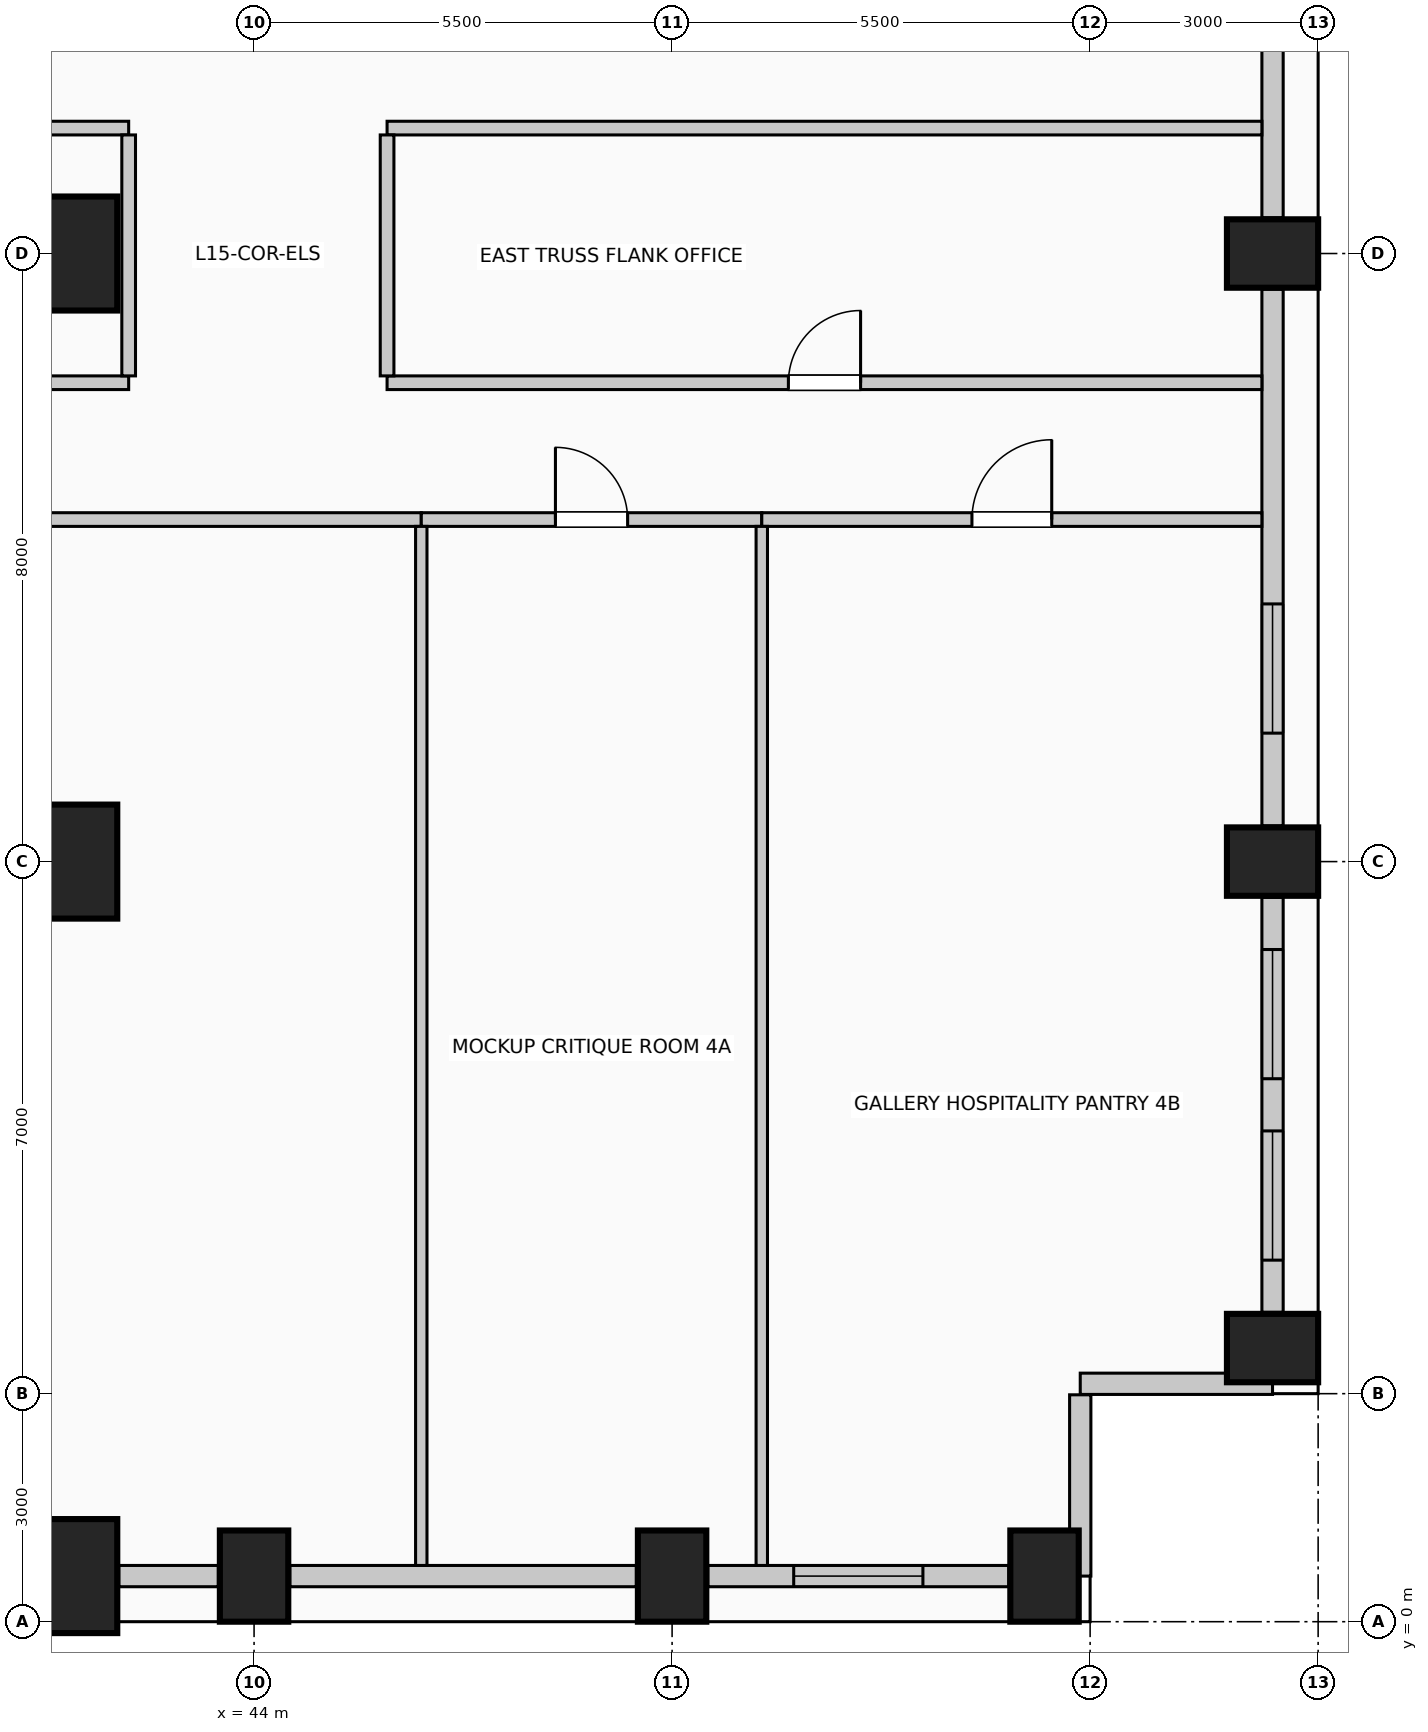
"""IFC4 building model, lengths in metres.
Left out: names, types, materials, properties, quantities, classifications, styles, units other than length and angle.
Written with IfcOpenShell. Run it as: python <this file> out.ifc"""

import sys

from ifc_helpers import new_model, si_unit, direction, frame, frame_2d, origin, origin_2d, place, context, subcontext, project, spatial, rectangle, extrude, element, fill, save


model = new_model("IFC4")
c1 = context("Model", 3, precision=1e-05, world=origin(), true_north=direction((0.0, 1.0)))
c2 = subcontext(c1, "Body", "Model", "MODEL_VIEW")
j1 = project(units=[si_unit("LENGTHUNIT", "METRE"), si_unit("PLANEANGLEUNIT", "RADIAN")], contexts=[c1])
p1 = place(None, origin())
s1 = spatial("IfcSite", under=j1, at=p1, CompositionType="ELEMENT")
p2 = place(p1, origin())
s2 = spatial("IfcBuilding", under=s1, at=p2, CompositionType="ELEMENT")
p3 = place(p2, frame((0.0, 0.0, 62.6)))
s3 = spatial("IfcBuildingStorey", under=s2, at=p3, CompositionType="ELEMENT", Elevation=62.6)
p4 = place(p3, frame((41.6, 0.6, 0.0), z_axis=(0.0, 0.0, 1.0), x_axis=(1.0, 0.0, 0.0)))
e1 = element("IfcColumn", 1, at=p4, inside=s3, PredefinedType="COLUMN", context=c2, shape_type="SweptSolid", body=[
    extrude(rectangle(XDim=1.2, YDim=1.5, at=origin_2d()), origin(), (0.0, 0.0, 1.0), 4.0),
])
for number, where, z_axis, x_axis in (
    (2, (44.0, 0.6, 0.0), (0.0, 0.0, 1.0), (1.0, 0.0, 0.0)),
    (3, (49.5, 0.6, 0.0), (0.0, 0.0, 1.0), (1.0, 0.0, 0.0)),
    (4, (54.4, 0.6, 0.0), (0.0, 0.0, 1.0), (1.0, 0.0, 0.0)),
    (5, (57.4, 3.6, 0.0), (0.0, 0.0, 1.0), (0.0, 1.0, 0.0)),
    (6, (57.4, 10.0, 0.0), (0.0, 0.0, 1.0), (0.0, 1.0, 0.0)),
    (7, (57.4, 18.0, 0.0), (0.0, 0.0, 1.0), (0.0, 1.0, 0.0)),
):
    element("IfcColumn", number, at=place(p3, frame(where, z_axis=z_axis, x_axis=x_axis)), inside=s3, PredefinedType="COLUMN", context=c2, shape_type="SweptSolid", body=[
        extrude(rectangle(XDim=0.9, YDim=1.2, at=origin_2d()), origin(), (0.0, 0.0, 1.0), 4.0),
    ])
for number, where, z_axis, x_axis in (
    (8, (41.6, 10.0, 0.0), (0.0, 0.0, 1.0), (1.0, 0.0, 0.0)),
    (9, (41.6, 18.0, 0.0), (0.0, 0.0, 1.0), (1.0, 0.0, 0.0)),
):
    element("IfcColumn", number, at=place(p3, frame(where, z_axis=z_axis, x_axis=x_axis)), inside=s3, PredefinedType="COLUMN", context=c2, shape_type="SweptSolid", body=[
        extrude(rectangle(XDim=1.2, YDim=1.5, at=origin_2d()), origin(), (0.0, 0.0, 1.0), 4.0),
    ])
p5 = place(p3, frame((43.53, 0.6, 0.0), z_axis=(0.0, 0.0, 1.0), x_axis=(-1.0, 0.0, 0.0)))
e10 = element("IfcWall", 10, at=p5, inside=s3, PredefinedType="SOLIDWALL", context=c2, shape_type="SweptSolid", body=[
    extrude(rectangle(XDim=1.31, YDim=0.28, at=frame_2d((0.655, 0.0))), origin(), (0.0, 0.0, 1.0), 2.85),
])
p6 = place(p3, frame((49.03, 0.6, 0.0), z_axis=(0.0, 0.0, 1.0), x_axis=(-1.0, 0.0, 0.0)))
e11 = element("IfcWall", 11, at=p6, inside=s3, PredefinedType="SOLIDWALL", context=c2, shape_type="SweptSolid", body=[
    extrude(rectangle(XDim=4.56, YDim=0.28, at=frame_2d((2.28, 0.0))), origin(), (0.0, 0.0, 1.0), 2.85),
])
p7 = place(p3, frame((53.93, 0.6, 0.0), z_axis=(0.0, 0.0, 1.0), x_axis=(-1.0, 0.0, 0.0)))
e12 = element("IfcWall", 12, at=p7, inside=s3, PredefinedType="SOLIDWALL", context=c2, shape_type="SweptSolid", body=[
    extrude(rectangle(XDim=3.96, YDim=0.28, at=frame_2d((1.98, 0.0))), origin(), (0.0, 0.0, 1.0), 2.85),
])
p8 = place(p7, frame((1.13, 0.0, 0.5)))
e13 = element("IfcOpeningElement", 13, at=p8, cuts=e12, PredefinedType="OPENING", context=c2, shape_type="SweptSolid", body=[
    extrude(rectangle(XDim=1.7, YDim=1.95, at=frame_2d((0.85, 0.975))), frame((0.0, 0.15, 0.0), z_axis=(0.0, -1.0, 0.0), x_axis=(1.0, 0.0, 0.0)), (0.0, 0.0, 1.0), 0.3),
])
p9 = place(p3, frame((57.4, 9.53, 0.0), z_axis=(0.0, 0.0, 1.0), x_axis=(0.0, -1.0, 0.0)))
e14 = element("IfcWall", 14, at=p9, inside=s3, PredefinedType="SOLIDWALL", context=c2, shape_type="SweptSolid", body=[
    extrude(rectangle(XDim=5.46, YDim=0.28, at=frame_2d((2.73, 0.0))), origin(), (0.0, 0.0, 1.0), 2.85),
])
p10 = place(p9, frame((0.687, 0.0, 0.5)))
e15 = element("IfcOpeningElement", 15, at=p10, cuts=e14, PredefinedType="OPENING", context=c2, shape_type="SweptSolid", body=[
    extrude(rectangle(XDim=1.7, YDim=1.95, at=frame_2d((0.85, 0.975))), frame((0.0, 0.15, 0.0), z_axis=(0.0, -1.0, 0.0), x_axis=(1.0, 0.0, 0.0)), (0.0, 0.0, 1.0), 0.3),
])
p11 = place(p9, frame((3.073, 0.0, 0.5)))
e16 = element("IfcOpeningElement", 16, at=p11, cuts=e14, PredefinedType="OPENING", context=c2, shape_type="SweptSolid", body=[
    extrude(rectangle(XDim=1.7, YDim=1.95, at=frame_2d((0.85, 0.975))), frame((0.0, 0.15, 0.0), z_axis=(0.0, -1.0, 0.0), x_axis=(1.0, 0.0, 0.0)), (0.0, 0.0, 1.0), 0.3),
])
p12 = place(p3, frame((57.4, 17.53, 0.0), z_axis=(0.0, 0.0, 1.0), x_axis=(0.0, -1.0, 0.0)))
e17 = element("IfcWall", 17, at=p12, inside=s3, PredefinedType="SOLIDWALL", context=c2, shape_type="SweptSolid", body=[
    extrude(rectangle(XDim=7.06, YDim=0.28, at=frame_2d((3.53, 0.0))), origin(), (0.0, 0.0, 1.0), 2.85),
])
p13 = place(p12, frame((4.14, 0.0, 0.5)))
e18 = element("IfcOpeningElement", 18, at=p13, cuts=e17, PredefinedType="OPENING", context=c2, shape_type="SweptSolid", body=[
    extrude(rectangle(XDim=1.7, YDim=1.95, at=frame_2d((0.85, 0.975))), frame((0.0, 0.15, 0.0), z_axis=(0.0, -1.0, 0.0), x_axis=(1.0, 0.0, 0.0)), (0.0, 0.0, 1.0), 0.3),
])
p14 = place(p3, frame((57.4, 25.53, 0.0), z_axis=(0.0, 0.0, 1.0), x_axis=(0.0, -1.0, 0.0)))
e19 = element("IfcWall", 19, at=p14, inside=s3, PredefinedType="SOLIDWALL", context=c2, shape_type="SweptSolid", body=[
    extrude(rectangle(XDim=7.06, YDim=0.28, at=frame_2d((3.53, 0.0))), origin(), (0.0, 0.0, 1.0), 2.85),
])
p15 = place(p3, frame((57.4, 3.13, 0.0), z_axis=(0.0, 0.0, 1.0), x_axis=(-1.0, 0.0, 0.0)))
e20 = element("IfcWall", 20, at=p15, inside=s3, PredefinedType="SOLIDWALL", context=c2, shape_type="SweptSolid", body=[
    extrude(rectangle(XDim=2.53, YDim=0.28, at=frame_2d((1.265, 0.0))), origin(), (0.0, 0.0, 1.0), 3.7),
])
p16 = place(p3, frame((54.87, 2.985, 0.0), z_axis=(0.0, 0.0, 1.0), x_axis=(0.0, -1.0, 0.0)))
e21 = element("IfcWall", 21, at=p16, inside=s3, PredefinedType="SOLIDWALL", context=c2, shape_type="SweptSolid", body=[
    extrude(rectangle(XDim=2.385, YDim=0.28, at=frame_2d((1.192, 0.0))), origin(), (0.0, 0.0, 1.0), 3.7),
])
p17 = place(p3, frame((31.8, 14.5, 0.0), z_axis=(0.0, 0.0, 1.0), x_axis=(1.0, 0.0, 0.0)))
e22 = element("IfcWall", 22, at=p17, inside=s3, PredefinedType="PARTITIONING", context=c2, shape_type="SweptSolid", body=[
    extrude(rectangle(XDim=14.4, YDim=0.18, at=frame_2d((7.2, 0.0))), origin(), (0.0, 0.0, 1.0), 3.7),
])
p18 = place(p17, frame((6.675, 0.0, 0.0)))
e23 = element("IfcOpeningElement", 23, at=p18, cuts=e22, PredefinedType="OPENING", context=c2, shape_type="SweptSolid", body=[
    extrude(rectangle(XDim=1.05, YDim=2.15, at=frame_2d((0.525, 1.075))), frame((0.0, 0.1, 0.0), z_axis=(0.0, -1.0, 0.0), x_axis=(1.0, 0.0, 0.0)), (0.0, 0.0, 1.0), 0.2),
])
p19 = place(p3, frame((46.2, 14.5, 0.0), z_axis=(0.0, 0.0, 1.0), x_axis=(1.0, 0.0, 0.0)))
e24 = element("IfcWall", 24, at=p19, inside=s3, PredefinedType="PARTITIONING", context=c2, shape_type="SweptSolid", body=[
    extrude(rectangle(XDim=4.48, YDim=0.18, at=frame_2d((2.24, 0.0))), origin(), (0.0, 0.0, 1.0), 3.7),
])
p20 = place(p19, frame((1.765, 0.0, 0.0)))
e25 = element("IfcOpeningElement", 25, at=p20, cuts=e24, PredefinedType="OPENING", context=c2, shape_type="SweptSolid", body=[
    extrude(rectangle(XDim=0.95, YDim=2.15, at=frame_2d((0.475, 1.075))), frame((0.0, 0.1, 0.0), z_axis=(0.0, -1.0, 0.0), x_axis=(1.0, 0.0, 0.0)), (0.0, 0.0, 1.0), 0.2),
])
p21 = place(p3, frame((50.68, 14.5, 0.0), z_axis=(0.0, 0.0, 1.0), x_axis=(1.0, 0.0, 0.0)))
e26 = element("IfcWall", 26, at=p21, inside=s3, PredefinedType="PARTITIONING", context=c2, shape_type="SweptSolid", body=[
    extrude(rectangle(XDim=6.58, YDim=0.18, at=frame_2d((3.29, 0.0))), origin(), (0.0, 0.0, 1.0), 3.7),
])
p22 = place(p21, frame((2.765, 0.0, 0.0)))
e27 = element("IfcOpeningElement", 27, at=p22, cuts=e26, PredefinedType="OPENING", context=c2, shape_type="SweptSolid", body=[
    extrude(rectangle(XDim=1.05, YDim=2.15, at=frame_2d((0.525, 1.075))), frame((0.0, 0.1, 0.0), z_axis=(0.0, -1.0, 0.0), x_axis=(1.0, 0.0, 0.0)), (0.0, 0.0, 1.0), 0.2),
])
p23 = place(p3, frame((15.65, 16.3, 0.0), z_axis=(0.0, 0.0, 1.0), x_axis=(1.0, 0.0, 0.0)))
e28 = element("IfcWall", 28, at=p23, inside=s3, PredefinedType="PARTITIONING", context=c2, shape_type="SweptSolid", body=[
    extrude(rectangle(XDim=26.7, YDim=0.18, at=frame_2d((13.35, 0.0))), origin(), (0.0, 0.0, 1.0), 3.7),
])
p24 = place(p3, frame((45.75, 16.3, 0.0), z_axis=(0.0, 0.0, 1.0), x_axis=(1.0, 0.0, 0.0)))
e29 = element("IfcWall", 29, at=p24, inside=s3, PredefinedType="PARTITIONING", context=c2, shape_type="SweptSolid", body=[
    extrude(rectangle(XDim=11.51, YDim=0.18, at=frame_2d((5.755, 0.0))), origin(), (0.0, 0.0, 1.0), 3.7),
])
p25 = place(p24, frame((5.28, 0.0, 0.0)))
e30 = element("IfcOpeningElement", 30, at=p25, cuts=e29, PredefinedType="OPENING", context=c2, shape_type="SweptSolid", body=[
    extrude(rectangle(XDim=0.95, YDim=2.15, at=frame_2d((0.475, 1.075))), frame((0.0, 0.1, 0.0), z_axis=(0.0, -1.0, 0.0), x_axis=(1.0, 0.0, 0.0)), (0.0, 0.0, 1.0), 0.2),
])
p26 = place(p3, frame((15.65, 19.65, 0.0), z_axis=(0.0, 0.0, 1.0), x_axis=(1.0, 0.0, 0.0)))
e31 = element("IfcWall", 31, at=p26, inside=s3, PredefinedType="PARTITIONING", context=c2, shape_type="SweptSolid", body=[
    extrude(rectangle(XDim=26.7, YDim=0.18, at=frame_2d((13.35, 0.0))), origin(), (0.0, 0.0, 1.0), 3.7),
])
p27 = place(p3, frame((45.75, 19.65, 0.0), z_axis=(0.0, 0.0, 1.0), x_axis=(1.0, 0.0, 0.0)))
e32 = element("IfcWall", 32, at=p27, inside=s3, PredefinedType="PARTITIONING", context=c2, shape_type="SweptSolid", body=[
    extrude(rectangle(XDim=11.51, YDim=0.18, at=frame_2d((5.755, 0.0))), origin(), (0.0, 0.0, 1.0), 3.7),
])
for number, where, z_axis, x_axis in (
    (33, (42.35, 16.39, 0.0), (0.0, 0.0, 1.0), (0.0, 1.0, 0.0)),
    (34, (45.75, 16.39, 0.0), (0.0, 0.0, 1.0), (0.0, 1.0, 0.0)),
):
    element("IfcWall", number, at=place(p3, frame(where, z_axis=z_axis, x_axis=x_axis)), inside=s3, PredefinedType="PARTITIONING", context=c2, shape_type="SweptSolid", body=[
        extrude(rectangle(XDim=3.17, YDim=0.18, at=frame_2d((1.585, 0.0))), origin(), (0.0, 0.0, 1.0), 3.7),
    ])
for number, where, z_axis, x_axis in (
    (35, (46.2, 0.74, 0.0), (0.0, 0.0, 1.0), (0.0, 1.0, 0.0)),
    (36, (50.68, 0.74, 0.0), (0.0, 0.0, 1.0), (0.0, 1.0, 0.0)),
):
    element("IfcWall", number, at=place(p3, frame(where, z_axis=z_axis, x_axis=x_axis)), inside=s3, PredefinedType="PARTITIONING", context=c2, shape_type="SweptSolid", body=[
        extrude(rectangle(XDim=13.67, YDim=0.15, at=frame_2d((6.835, 0.0))), origin(), (0.0, 0.0, 1.0), 3.7),
    ])
p28 = place(p8, origin())
e37 = element("IfcWindow", 37, at=p28, inside=s3, PartitioningType="SINGLE_PANEL", PredefinedType="WINDOW", context=c2, shape_type="SweptSolid", body=[
    extrude(rectangle(XDim=1.7, YDim=1.95, at=frame_2d((0.85, 0.975))), frame((0.0, 0.03, 0.0), z_axis=(0.0, -1.0, 0.0), x_axis=(1.0, 0.0, 0.0)), (0.0, 0.0, 1.0), 0.06),
])
fill(e13, e37)
p29 = place(p10, origin())
e38 = element("IfcWindow", 38, at=p29, inside=s3, PartitioningType="SINGLE_PANEL", PredefinedType="WINDOW", context=c2, shape_type="SweptSolid", body=[
    extrude(rectangle(XDim=1.7, YDim=1.95, at=frame_2d((0.85, 0.975))), frame((0.0, 0.03, 0.0), z_axis=(0.0, -1.0, 0.0), x_axis=(1.0, 0.0, 0.0)), (0.0, 0.0, 1.0), 0.06),
])
fill(e15, e38)
p30 = place(p11, origin())
e39 = element("IfcWindow", 39, at=p30, inside=s3, PartitioningType="SINGLE_PANEL", PredefinedType="WINDOW", context=c2, shape_type="SweptSolid", body=[
    extrude(rectangle(XDim=1.7, YDim=1.95, at=frame_2d((0.85, 0.975))), frame((0.0, 0.03, 0.0), z_axis=(0.0, -1.0, 0.0), x_axis=(1.0, 0.0, 0.0)), (0.0, 0.0, 1.0), 0.06),
])
fill(e16, e39)
p31 = place(p13, origin())
e40 = element("IfcWindow", 40, at=p31, inside=s3, PartitioningType="SINGLE_PANEL", PredefinedType="WINDOW", context=c2, shape_type="SweptSolid", body=[
    extrude(rectangle(XDim=1.7, YDim=1.95, at=frame_2d((0.85, 0.975))), frame((0.0, 0.03, 0.0), z_axis=(0.0, -1.0, 0.0), x_axis=(1.0, 0.0, 0.0)), (0.0, 0.0, 1.0), 0.06),
])
fill(e18, e40)
p32 = place(p20, origin())
e41 = element("IfcDoor", 41, at=p32, inside=s3, OperationType="SINGLE_SWING_LEFT", PredefinedType="DOOR", context=c2, shape_type="SweptSolid", body=[
    extrude(rectangle(XDim=0.95, YDim=2.15, at=frame_2d((0.475, 1.075))), frame((0.0, 0.025, 0.0), z_axis=(0.0, -1.0, 0.0), x_axis=(1.0, 0.0, 0.0)), (0.0, 0.0, 1.0), 0.05),
])
fill(e25, e41)
p33 = place(p22, origin())
e42 = element("IfcDoor", 42, at=p33, inside=s3, OperationType="SINGLE_SWING_RIGHT", PredefinedType="DOOR", context=c2, shape_type="SweptSolid", body=[
    extrude(rectangle(XDim=1.05, YDim=2.15, at=frame_2d((0.525, 1.075))), frame((0.0, 0.025, 0.0), z_axis=(0.0, -1.0, 0.0), x_axis=(1.0, 0.0, 0.0)), (0.0, 0.0, 1.0), 0.05),
])
fill(e27, e42)
p34 = place(p25, origin())
e43 = element("IfcDoor", 43, at=p34, inside=s3, OperationType="SINGLE_SWING_RIGHT", PredefinedType="DOOR", context=c2, shape_type="SweptSolid", body=[
    extrude(rectangle(XDim=0.95, YDim=2.15, at=frame_2d((0.475, 1.075))), frame((0.0, 0.025, 0.0), z_axis=(0.0, -1.0, 0.0), x_axis=(1.0, 0.0, 0.0)), (0.0, 0.0, 1.0), 0.05),
])
fill(e30, e43)
save(model, sys.argv[1])
